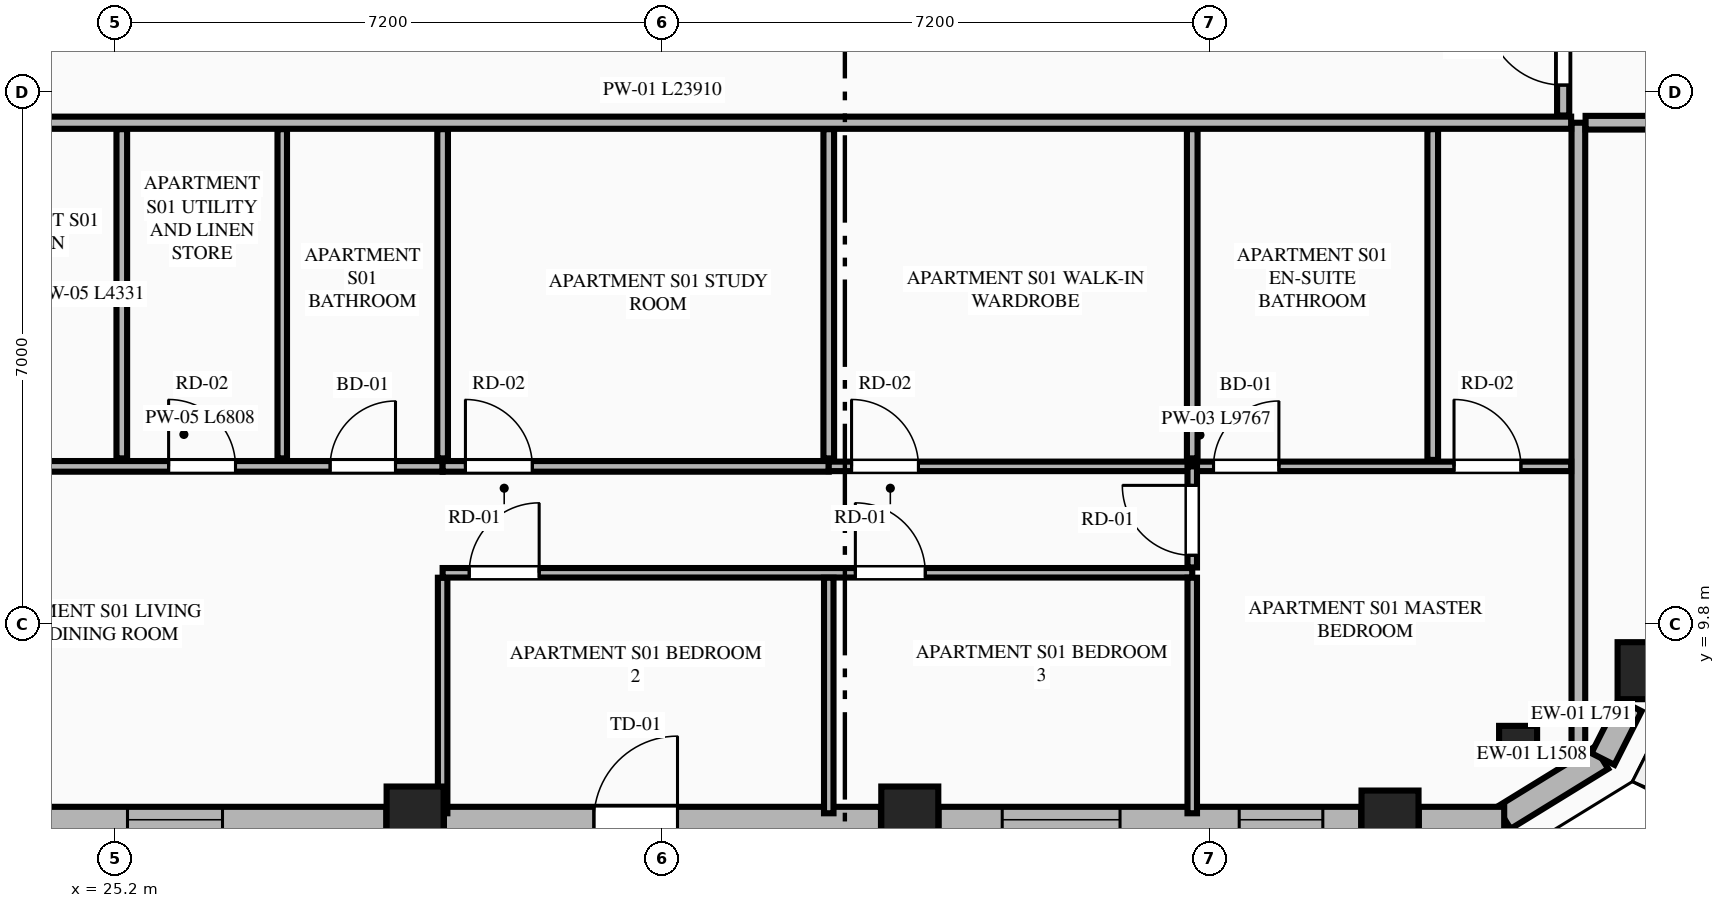
"""IFC4 building model, lengths in metres.
Left out: names, types, materials, properties, quantities, classifications, styles, units other than length and angle.
Written with IfcOpenShell. Run it as: python <this file> out.ifc"""

import sys

from ifc_helpers import new_model, si_unit, direction, frame, frame_2d, origin, origin_2d, place, context, subcontext, project, spatial, rectangle, extrude, element, fill, save


model = new_model("IFC4")
c1 = context("Model", 3, precision=1e-05, world=origin(), true_north=direction((0.0, 1.0)))
c2 = subcontext(c1, "Body", "Model", "MODEL_VIEW")
j1 = project(units=[si_unit("LENGTHUNIT", "METRE"), si_unit("PLANEANGLEUNIT", "RADIAN")], contexts=[c1])
p1 = place(None, origin())
s1 = spatial("IfcSite", under=j1, at=p1, CompositionType="ELEMENT")
p2 = place(p1, origin())
s2 = spatial("IfcBuilding", under=s1, at=p2, CompositionType="ELEMENT")
p3 = place(p2, frame((0.0, 0.0, 248.9)))
s3 = spatial("IfcBuildingStorey", under=s2, at=p3, CompositionType="ELEMENT", Elevation=248.9)
for number, where, z_axis, x_axis in (
    (1, (29.146, 7.292, 0.0), (0.0, 0.0, 1.0), (1.0, 0.0, 0.0)),
    (2, (35.654, 7.292, 0.0), (0.0, 0.0, 1.0), (1.0, 0.0, 0.0)),
    (3, (41.972, 7.239, 0.0), (0.0, 0.0, 1.0), (1.0, 0.0, 0.0)),
    (4, (45.341, 9.191, 0.0), (0.0, 0.0, 1.0), (1.0, 0.0, 0.0)),
):
    element("IfcColumn", number, at=place(p3, frame(where, z_axis=z_axis, x_axis=x_axis)), inside=s3, PredefinedType="COLUMN", context=c2, shape_type="SweptSolid", body=[
        extrude(rectangle(XDim=0.75, YDim=0.75, at=origin_2d()), origin(), (0.0, 0.0, 1.0), 3.65),
    ])
p4 = place(p3, frame((43.657, 8.215, 0.0), z_axis=(0.0, 0.0, 1.0), x_axis=(0.865256437757, 0.501329529272, 0.0)))
e5 = element("IfcColumn", 5, at=p4, inside=s3, PredefinedType="PILASTER", context=c2, shape_type="SweptSolid", body=[
    extrude(rectangle(XDim=0.5, YDim=0.35, at=origin_2d()), origin(), (0.0, 0.0, 1.0), 3.65),
])
p5 = place(p3, frame((43.469, 7.255, 0.0), z_axis=(0.0, 0.0, 1.0), x_axis=(0.851680557619, 0.52406128246, 0.0)))
e6 = element("IfcWall", 6, at=p5, inside=s3, PredefinedType="STANDARD", context=c2, shape_type="SweptSolid", body=[
    extrude(rectangle(XDim=1.508, YDim=0.34, at=frame_2d((0.754, 0.0))), origin(), (0.0, 0.0, 1.0), 3.45),
])
p6 = place(p3, frame((23.207, 7.23, 0.0), z_axis=(0.0, 0.0, 1.0), x_axis=(1.0, 0.0, 0.0)))
e7 = element("IfcWall", 7, at=p6, inside=s3, PredefinedType="STANDARD", context=c2, shape_type="SweptSolid", body=[
    extrude(rectangle(XDim=5.56, YDim=0.34, at=frame_2d((2.78, 0.0))), origin(), (0.0, 0.0, 1.0), 2.983),
])
p7 = place(p6, frame((2.155, 0.0, 0.75)))
e8 = element("IfcOpeningElement", 8, at=p7, cuts=e7, PredefinedType="OPENING", context=c2, shape_type="SweptSolid", body=[
    extrude(rectangle(XDim=1.25, YDim=1.95, at=frame_2d((0.625, 0.975))), frame((0.0, 0.18, 0.0), z_axis=(0.0, -1.0, 0.0), x_axis=(1.0, 0.0, 0.0)), (0.0, 0.0, 1.0), 0.36),
])
p8 = place(p3, frame((29.525, 7.23, 0.0), z_axis=(0.0, 0.0, 1.0), x_axis=(1.0, 0.0, 0.0)))
e9 = element("IfcWall", 9, at=p8, inside=s3, PredefinedType="STANDARD", context=c2, shape_type="SweptSolid", body=[
    extrude(rectangle(XDim=5.75, YDim=0.34, at=frame_2d((2.875, 0.0))), origin(), (0.0, 0.0, 1.0), 2.983),
])
p9 = place(p8, frame((1.973, 0.0, 0.0)))
e10 = element("IfcOpeningElement", 10, at=p9, cuts=e9, PredefinedType="OPENING", context=c2, shape_type="SweptSolid", body=[
    extrude(rectangle(XDim=1.1, YDim=2.25, at=frame_2d((0.55, 1.125))), frame((0.0, 0.18, 0.0), z_axis=(0.0, -1.0, 0.0), x_axis=(1.0, 0.0, 0.0)), (0.0, 0.0, 1.0), 0.36),
])
p10 = place(p3, frame((36.033, 7.23, 0.0), z_axis=(0.0, 0.0, 1.0), x_axis=(1.0, 0.0, 0.0)))
e11 = element("IfcWall", 11, at=p10, inside=s3, PredefinedType="STANDARD", context=c2, shape_type="SweptSolid", body=[
    extrude(rectangle(XDim=5.56, YDim=0.34, at=frame_2d((2.78, 0.0))), origin(), (0.0, 0.0, 1.0), 2.983),
])
p11 = place(p10, frame((0.837, 0.0, 0.75)))
e12 = element("IfcOpeningElement", 12, at=p11, cuts=e11, PredefinedType="OPENING", context=c2, shape_type="SweptSolid", body=[
    extrude(rectangle(XDim=1.55, YDim=2.05, at=frame_2d((0.775, 1.025))), frame((0.0, 0.18, 0.0), z_axis=(0.0, -1.0, 0.0), x_axis=(1.0, 0.0, 0.0)), (0.0, 0.0, 1.0), 0.36),
])
p12 = place(p10, frame((3.955, 0.0, 0.75)))
e13 = element("IfcOpeningElement", 13, at=p12, cuts=e11, PredefinedType="OPENING", context=c2, shape_type="SweptSolid", body=[
    extrude(rectangle(XDim=1.1, YDim=2.0, at=frame_2d((0.55, 1.0))), frame((0.0, 0.18, 0.0), z_axis=(0.0, -1.0, 0.0), x_axis=(1.0, 0.0, 0.0)), (0.0, 0.0, 1.0), 0.36),
])
p13 = place(p3, frame((42.351, 7.23, 0.0), z_axis=(0.0, 0.0, 1.0), x_axis=(1.0, 0.0, 0.0)))
e14 = element("IfcWall", 14, at=p13, inside=s3, PredefinedType="STANDARD", context=c2, shape_type="SweptSolid", body=[
    extrude(rectangle(XDim=1.123, YDim=0.34, at=frame_2d((0.562, 0.0))), origin(), (0.0, 0.0, 1.0), 3.45),
])
p14 = place(p3, frame((44.773, 8.029, 0.0), z_axis=(0.0, 0.0, 1.0), x_axis=(0.451159191899, 0.892443490404, 0.0)))
e15 = element("IfcWall", 15, at=p14, inside=s3, PredefinedType="STANDARD", context=c2, shape_type="SweptSolid", body=[
    extrude(rectangle(XDim=0.791, YDim=0.34, at=frame_2d((0.396, 0.0))), origin(), (0.0, 0.0, 1.0), 3.45),
])
p15 = place(p3, frame((44.45, 8.119, 0.0), z_axis=(0.0, 0.0, 1.0), x_axis=(0.0, 1.0, 0.0)))
e16 = element("IfcWall", 16, at=p15, inside=s3, PredefinedType="PARTITIONING", context=c2, shape_type="SweptSolid", body=[
    extrude(rectangle(XDim=8.281, YDim=0.18, at=frame_2d((4.141, 0.0))), origin(), (0.0, 0.0, 1.0), 3.45),
])
p16 = place(p3, frame((20.445, 16.4, 0.0), z_axis=(0.0, 0.0, 1.0), x_axis=(1.0, 0.0, 0.0)))
e17 = element("IfcWall", 17, at=p16, inside=s3, PredefinedType="PARTITIONING", context=c2, shape_type="SweptSolid", body=[
    extrude(rectangle(XDim=23.91, YDim=0.16, at=frame_2d((11.955, 0.0))), origin(), (0.0, 0.0, 1.0), 3.45),
])
p17 = place(p16, frame((0.705, 0.0, 0.0)))
e18 = element("IfcOpeningElement", 18, at=p17, cuts=e17, PredefinedType="OPENING", context=c2, shape_type="SweptSolid", body=[
    extrude(rectangle(XDim=1.35, YDim=2.35, at=frame_2d((0.675, 1.175))), frame((0.0, 0.09, 0.0), z_axis=(0.0, -1.0, 0.0), x_axis=(1.0, 0.0, 0.0)), (0.0, 0.0, 1.0), 0.18),
])
p18 = place(p3, frame((22.7, 11.879, 0.0), z_axis=(0.0, 0.0, 1.0), x_axis=(1.0, 0.0, 0.0)))
e19 = element("IfcWall", 19, at=p18, inside=s3, PredefinedType="PLUMBINGWALL", context=c2, shape_type="SweptSolid", body=[
    extrude(rectangle(XDim=6.808, YDim=0.14, at=frame_2d((3.404, 0.0))), origin(), (0.0, 0.0, 1.0), 3.45),
])
p19 = place(p18, frame((5.328, 0.0, 0.0)))
e20 = element("IfcOpeningElement", 20, at=p19, cuts=e19, PredefinedType="OPENING", context=c2, shape_type="SweptSolid", body=[
    extrude(rectangle(XDim=0.86, YDim=2.1, at=frame_2d((0.43, 1.05))), frame((0.0, 0.08, 0.0), z_axis=(0.0, -1.0, 0.0), x_axis=(1.0, 0.0, 0.0)), (0.0, 0.0, 1.0), 0.16),
])
p20 = place(p18, frame((0.26, 0.0, 0.0)))
e21 = element("IfcOpeningElement", 21, at=p20, cuts=e19, PredefinedType="OPENING", context=c2, shape_type="SweptSolid", body=[
    extrude(rectangle(XDim=0.88, YDim=2.15, at=frame_2d((0.44, 1.075))), frame((0.0, 0.08, 0.0), z_axis=(0.0, -1.0, 0.0), x_axis=(1.0, 0.0, 0.0)), (0.0, 0.0, 1.0), 0.16),
])
p21 = place(p18, frame((3.203, 0.0, 0.0)))
e22 = element("IfcOpeningElement", 22, at=p21, cuts=e19, PredefinedType="OPENING", context=c2, shape_type="SweptSolid", body=[
    extrude(rectangle(XDim=0.88, YDim=2.15, at=frame_2d((0.44, 1.075))), frame((0.0, 0.08, 0.0), z_axis=(0.0, -1.0, 0.0), x_axis=(1.0, 0.0, 0.0)), (0.0, 0.0, 1.0), 0.16),
])
p22 = place(p3, frame((29.508, 11.879, 0.0), z_axis=(0.0, 0.0, 1.0), x_axis=(1.0, 0.0, 0.0)))
e23 = element("IfcWall", 23, at=p22, inside=s3, PredefinedType="PLUMBINGWALL", context=c2, shape_type="SweptSolid", body=[
    extrude(rectangle(XDim=5.08, YDim=0.14, at=frame_2d((2.54, 0.0))), origin(), (0.0, 0.0, 1.0), 3.45),
])
p23 = place(p22, frame((0.3, 0.0, 0.0)))
e24 = element("IfcOpeningElement", 24, at=p23, cuts=e23, PredefinedType="OPENING", context=c2, shape_type="SweptSolid", body=[
    extrude(rectangle(XDim=0.88, YDim=2.15, at=frame_2d((0.44, 1.075))), frame((0.0, 0.08, 0.0), z_axis=(0.0, -1.0, 0.0), x_axis=(1.0, 0.0, 0.0)), (0.0, 0.0, 1.0), 0.16),
])
p24 = place(p3, frame((34.588, 11.879, 0.0), z_axis=(0.0, 0.0, 1.0), x_axis=(1.0, 0.0, 0.0)))
e25 = element("IfcWall", 25, at=p24, inside=s3, PredefinedType="PARTITIONING", context=c2, shape_type="SweptSolid", body=[
    extrude(rectangle(XDim=9.767, YDim=0.125, at=frame_2d((4.884, 0.0))), origin(), (0.0, 0.0, 1.0), 3.45),
])
p25 = place(p24, frame((5.062, 0.0, 0.0)))
e26 = element("IfcOpeningElement", 26, at=p25, cuts=e25, PredefinedType="OPENING", context=c2, shape_type="SweptSolid", body=[
    extrude(rectangle(XDim=0.86, YDim=2.1, at=frame_2d((0.43, 1.05))), frame((0.0, 0.073, 0.0), z_axis=(0.0, -1.0, 0.0), x_axis=(1.0, 0.0, 0.0)), (0.0, 0.0, 1.0), 0.145),
])
p26 = place(p24, frame((8.226, 0.0, 0.0)))
e27 = element("IfcOpeningElement", 27, at=p26, cuts=e25, PredefinedType="OPENING", context=c2, shape_type="SweptSolid", body=[
    extrude(rectangle(XDim=0.88, YDim=2.15, at=frame_2d((0.44, 1.075))), frame((0.0, 0.073, 0.0), z_axis=(0.0, -1.0, 0.0), x_axis=(1.0, 0.0, 0.0)), (0.0, 0.0, 1.0), 0.145),
])
p27 = place(p24, frame((0.3, 0.0, 0.0)))
e28 = element("IfcOpeningElement", 28, at=p27, cuts=e25, PredefinedType="OPENING", context=c2, shape_type="SweptSolid", body=[
    extrude(rectangle(XDim=0.88, YDim=2.15, at=frame_2d((0.44, 1.075))), frame((0.0, 0.073, 0.0), z_axis=(0.0, -1.0, 0.0), x_axis=(1.0, 0.0, 0.0)), (0.0, 0.0, 1.0), 0.145),
])
p28 = place(p3, frame((25.287, 11.984, 0.0), z_axis=(0.0, 0.0, 1.0), x_axis=(0.0, 1.0, 0.0)))
e29 = element("IfcWall", 29, at=p28, inside=s3, PredefinedType="PLUMBINGWALL", context=c2, shape_type="SweptSolid", body=[
    extrude(rectangle(XDim=4.331, YDim=0.14, at=frame_2d((2.166, 0.0))), origin(), (0.0, 0.0, 1.0), 3.45),
])
p29 = place(p3, frame((27.398, 11.984, 0.0), z_axis=(0.0, 0.0, 1.0), x_axis=(0.0, 1.0, 0.0)))
e30 = element("IfcWall", 30, at=p29, inside=s3, PredefinedType="PARTITIONING", context=c2, shape_type="SweptSolid", body=[
    extrude(rectangle(XDim=4.331, YDim=0.125, at=frame_2d((2.166, 0.0))), origin(), (0.0, 0.0, 1.0), 3.45),
])
p30 = place(p3, frame((29.508, 7.315, 0.0), z_axis=(0.0, 0.0, 1.0), x_axis=(0.0, 1.0, 0.0)))
e31 = element("IfcWall", 31, at=p30, inside=s3, PredefinedType="PARTITIONING", context=c2, shape_type="SweptSolid", body=[
    extrude(rectangle(XDim=3.099, YDim=0.125, at=frame_2d((1.55, 0.0))), origin(), (0.0, 0.0, 1.0), 3.45),
])
p31 = place(p3, frame((29.508, 10.479, 0.0), z_axis=(0.0, 0.0, 1.0), x_axis=(1.0, 0.0, 0.0)))
e32 = element("IfcWall", 32, at=p31, inside=s3, PredefinedType="PARTITIONING", context=c2, shape_type="SweptSolid", body=[
    extrude(rectangle(XDim=9.862, YDim=0.125, at=frame_2d((4.931, 0.0))), origin(), (0.0, 0.0, 1.0), 3.45),
])
p32 = place(p31, frame((0.35, 0.0, 0.0)))
e33 = element("IfcOpeningElement", 33, at=p32, cuts=e32, PredefinedType="OPENING", context=c2, shape_type="SweptSolid", body=[
    extrude(rectangle(XDim=0.92, YDim=2.15, at=frame_2d((0.46, 1.075))), frame((0.0, 0.073, 0.0), z_axis=(0.0, -1.0, 0.0), x_axis=(1.0, 0.0, 0.0)), (0.0, 0.0, 1.0), 0.145),
])
p33 = place(p31, frame((5.43, 0.0, 0.0)))
e34 = element("IfcOpeningElement", 34, at=p33, cuts=e32, PredefinedType="OPENING", context=c2, shape_type="SweptSolid", body=[
    extrude(rectangle(XDim=0.92, YDim=2.15, at=frame_2d((0.46, 1.075))), frame((0.0, 0.073, 0.0), z_axis=(0.0, -1.0, 0.0), x_axis=(1.0, 0.0, 0.0)), (0.0, 0.0, 1.0), 0.145),
])
p34 = place(p3, frame((39.37, 10.549, 0.0), z_axis=(0.0, 0.0, 1.0), x_axis=(0.0, 1.0, 0.0)))
e35 = element("IfcWall", 35, at=p34, inside=s3, PredefinedType="PARTITIONING", context=c2, shape_type="SweptSolid", body=[
    extrude(rectangle(XDim=1.33, YDim=0.125, at=frame_2d((0.665, 0.0))), origin(), (0.0, 0.0, 1.0), 3.45),
])
p35 = place(p34, frame((0.16, 0.0, 0.0)))
e36 = element("IfcOpeningElement", 36, at=p35, cuts=e35, PredefinedType="OPENING", context=c2, shape_type="SweptSolid", body=[
    extrude(rectangle(XDim=0.92, YDim=2.15, at=frame_2d((0.46, 1.075))), frame((0.0, 0.073, 0.0), z_axis=(0.0, -1.0, 0.0), x_axis=(1.0, 0.0, 0.0)), (0.0, 0.0, 1.0), 0.145),
])
for number, where, z_axis, x_axis in (
    (37, (29.508, 11.984, 0.0), (0.0, 0.0, 1.0), (0.0, 1.0, 0.0)),
    (38, (34.588, 11.984, 0.0), (0.0, 0.0, 1.0), (0.0, 1.0, 0.0)),
):
    element("IfcWall", number, at=place(p3, frame(where, z_axis=z_axis, x_axis=x_axis)), inside=s3, PredefinedType="PLUMBINGWALL", context=c2, shape_type="SweptSolid", body=[
        extrude(rectangle(XDim=4.331, YDim=0.14, at=frame_2d((2.166, 0.0))), origin(), (0.0, 0.0, 1.0), 3.45),
    ])
for number, where, z_axis, x_axis in (
    (39, (34.588, 7.315, 0.0), (0.0, 0.0, 1.0), (0.0, 1.0, 0.0)),
    (40, (39.37, 7.315, 0.0), (0.0, 0.0, 1.0), (0.0, 1.0, 0.0)),
):
    element("IfcWall", number, at=place(p3, frame(where, z_axis=z_axis, x_axis=x_axis)), inside=s3, PredefinedType="PARTITIONING", context=c2, shape_type="SweptSolid", body=[
        extrude(rectangle(XDim=3.099, YDim=0.125, at=frame_2d((1.55, 0.0))), origin(), (0.0, 0.0, 1.0), 3.45),
    ])
p36 = place(p3, frame((39.37, 11.984, 0.0), z_axis=(0.0, 0.0, 1.0), x_axis=(0.0, 1.0, 0.0)))
e41 = element("IfcWall", 41, at=p36, inside=s3, PredefinedType="PLUMBINGWALL", context=c2, shape_type="SweptSolid", body=[
    extrude(rectangle(XDim=4.331, YDim=0.14, at=frame_2d((2.166, 0.0))), origin(), (0.0, 0.0, 1.0), 3.45),
])
p37 = place(p3, frame((42.534, 11.964, 0.0), z_axis=(0.0, 0.0, 1.0), x_axis=(0.0, 1.0, 0.0)))
e42 = element("IfcWall", 42, at=p37, inside=s3, PredefinedType="PLUMBINGWALL", context=c2, shape_type="SweptSolid", body=[
    extrude(rectangle(XDim=4.351, YDim=0.14, at=frame_2d((2.175, 0.0))), origin(), (0.0, 0.0, 1.0), 3.45),
])
p38 = place(p3, frame((44.545, 16.4, 0.0), z_axis=(0.0, 0.0, 1.0), x_axis=(1.0, 0.0, 0.0)))
e43 = element("IfcWall", 43, at=p38, inside=s3, PredefinedType="PARTITIONING", context=c2, shape_type="SweptSolid", body=[
    extrude(rectangle(XDim=4.221, YDim=0.18, at=frame_2d((2.111, 0.0))), origin(), (0.0, 0.0, 1.0), 3.45),
])
p39 = place(p3, frame((44.25, 16.495, 0.0), z_axis=(0.0, 0.0, 1.0), x_axis=(0.0, 1.0, 0.0)))
e44 = element("IfcWall", 44, at=p39, inside=s3, PredefinedType="PARTITIONING", context=c2, shape_type="SweptSolid", body=[
    extrude(rectangle(XDim=6.134, YDim=0.16, at=frame_2d((3.067, 0.0))), origin(), (0.0, 0.0, 1.0), 3.137),
])
p40 = place(p39, frame((0.4, 0.0, 0.0)))
e45 = element("IfcOpeningElement", 45, at=p40, cuts=e44, PredefinedType="OPENING", context=c2, shape_type="SweptSolid", body=[
    extrude(rectangle(XDim=1.02, YDim=2.25, at=frame_2d((0.51, 1.125))), frame((0.0, 0.09, 0.0), z_axis=(0.0, -1.0, 0.0), x_axis=(1.0, 0.0, 0.0)), (0.0, 0.0, 1.0), 0.18),
])
p41 = place(p7, origin())
e46 = element("IfcWindow", 46, at=p41, inside=s3, PartitioningType="SINGLE_PANEL", PredefinedType="WINDOW", context=c2, shape_type="SweptSolid", body=[
    extrude(rectangle(XDim=1.25, YDim=1.95, at=frame_2d((0.625, 0.975))), frame((0.0, 0.03, 0.0), z_axis=(0.0, -1.0, 0.0), x_axis=(1.0, 0.0, 0.0)), (0.0, 0.0, 1.0), 0.06),
])
fill(e8, e46)
p42 = place(p9, origin())
e47 = element("IfcDoor", 47, at=p42, inside=s3, OperationType="SINGLE_SWING_RIGHT", PredefinedType="DOOR", context=c2, shape_type="SweptSolid", body=[
    extrude(rectangle(XDim=1.1, YDim=2.25, at=frame_2d((0.55, 1.125))), frame((0.0, 0.025, 0.0), z_axis=(0.0, -1.0, 0.0), x_axis=(1.0, 0.0, 0.0)), (0.0, 0.0, 1.0), 0.05),
])
fill(e10, e47)
p43 = place(p11, origin())
e48 = element("IfcWindow", 48, at=p43, inside=s3, PartitioningType="SINGLE_PANEL", PredefinedType="WINDOW", context=c2, shape_type="SweptSolid", body=[
    extrude(rectangle(XDim=1.55, YDim=2.05, at=frame_2d((0.775, 1.025))), frame((0.0, 0.03, 0.0), z_axis=(0.0, -1.0, 0.0), x_axis=(1.0, 0.0, 0.0)), (0.0, 0.0, 1.0), 0.06),
])
fill(e12, e48)
p44 = place(p19, origin())
e49 = element("IfcDoor", 49, at=p44, inside=s3, OperationType="SINGLE_SWING_RIGHT", PredefinedType="DOOR", context=c2, shape_type="SweptSolid", body=[
    extrude(rectangle(XDim=0.86, YDim=2.1, at=frame_2d((0.43, 1.05))), frame((0.0, 0.025, 0.0), z_axis=(0.0, -1.0, 0.0), x_axis=(1.0, 0.0, 0.0)), (0.0, 0.0, 1.0), 0.05),
])
fill(e20, e49)
p45 = place(p25, origin())
e50 = element("IfcDoor", 50, at=p45, inside=s3, OperationType="SINGLE_SWING_RIGHT", PredefinedType="DOOR", context=c2, shape_type="SweptSolid", body=[
    extrude(rectangle(XDim=0.86, YDim=2.1, at=frame_2d((0.43, 1.05))), frame((0.0, 0.025, 0.0), z_axis=(0.0, -1.0, 0.0), x_axis=(1.0, 0.0, 0.0)), (0.0, 0.0, 1.0), 0.05),
])
fill(e26, e50)
p46 = place(p26, origin())
e51 = element("IfcDoor", 51, at=p46, inside=s3, OperationType="SINGLE_SWING_LEFT", PredefinedType="DOOR", context=c2, shape_type="SweptSolid", body=[
    extrude(rectangle(XDim=0.88, YDim=2.15, at=frame_2d((0.44, 1.075))), frame((0.0, 0.025, 0.0), z_axis=(0.0, -1.0, 0.0), x_axis=(1.0, 0.0, 0.0)), (0.0, 0.0, 1.0), 0.05),
])
fill(e27, e51)
p47 = place(p21, origin())
e52 = element("IfcDoor", 52, at=p47, inside=s3, OperationType="SINGLE_SWING_LEFT", PredefinedType="DOOR", context=c2, shape_type="SweptSolid", body=[
    extrude(rectangle(XDim=0.88, YDim=2.15, at=frame_2d((0.44, 1.075))), frame((0.0, 0.025, 0.0), z_axis=(0.0, -1.0, 0.0), x_axis=(1.0, 0.0, 0.0)), (0.0, 0.0, 1.0), 0.05),
])
fill(e22, e52)
p48 = place(p23, origin())
e53 = element("IfcDoor", 53, at=p48, inside=s3, OperationType="SINGLE_SWING_LEFT", PredefinedType="DOOR", context=c2, shape_type="SweptSolid", body=[
    extrude(rectangle(XDim=0.88, YDim=2.15, at=frame_2d((0.44, 1.075))), frame((0.0, 0.025, 0.0), z_axis=(0.0, -1.0, 0.0), x_axis=(1.0, 0.0, 0.0)), (0.0, 0.0, 1.0), 0.05),
])
fill(e24, e53)
p49 = place(p32, origin())
e54 = element("IfcDoor", 54, at=p49, inside=s3, OperationType="SINGLE_SWING_RIGHT", PredefinedType="DOOR", context=c2, shape_type="SweptSolid", body=[
    extrude(rectangle(XDim=0.92, YDim=2.15, at=frame_2d((0.46, 1.075))), frame((0.0, 0.025, 0.0), z_axis=(0.0, -1.0, 0.0), x_axis=(1.0, 0.0, 0.0)), (0.0, 0.0, 1.0), 0.05),
])
fill(e33, e54)
p50 = place(p33, origin())
e55 = element("IfcDoor", 55, at=p50, inside=s3, OperationType="SINGLE_SWING_LEFT", PredefinedType="DOOR", context=c2, shape_type="SweptSolid", body=[
    extrude(rectangle(XDim=0.92, YDim=2.15, at=frame_2d((0.46, 1.075))), frame((0.0, 0.025, 0.0), z_axis=(0.0, -1.0, 0.0), x_axis=(1.0, 0.0, 0.0)), (0.0, 0.0, 1.0), 0.05),
])
fill(e34, e55)
p51 = place(p35, origin())
e56 = element("IfcDoor", 56, at=p51, inside=s3, OperationType="SINGLE_SWING_RIGHT", PredefinedType="DOOR", context=c2, shape_type="SweptSolid", body=[
    extrude(rectangle(XDim=0.92, YDim=2.15, at=frame_2d((0.46, 1.075))), frame((0.0, 0.025, 0.0), z_axis=(0.0, -1.0, 0.0), x_axis=(1.0, 0.0, 0.0)), (0.0, 0.0, 1.0), 0.05),
])
fill(e36, e56)
p52 = place(p27, origin())
e57 = element("IfcDoor", 57, at=p52, inside=s3, OperationType="SINGLE_SWING_LEFT", PredefinedType="DOOR", context=c2, shape_type="SweptSolid", body=[
    extrude(rectangle(XDim=0.88, YDim=2.15, at=frame_2d((0.44, 1.075))), frame((0.0, 0.025, 0.0), z_axis=(0.0, -1.0, 0.0), x_axis=(1.0, 0.0, 0.0)), (0.0, 0.0, 1.0), 0.05),
])
fill(e28, e57)
p53 = place(p40, origin())
e58 = element("IfcDoor", 58, at=p53, inside=s3, OperationType="SINGLE_SWING_RIGHT", PredefinedType="DOOR", context=c2, shape_type="SweptSolid", body=[
    extrude(rectangle(XDim=1.02, YDim=2.25, at=frame_2d((0.51, 1.125))), frame((0.0, 0.025, 0.0), z_axis=(0.0, -1.0, 0.0), x_axis=(1.0, 0.0, 0.0)), (0.0, 0.0, 1.0), 0.05),
])
fill(e45, e58)
p54 = place(p12, origin())
e59 = element("IfcWindow", 59, at=p54, inside=s3, PartitioningType="SINGLE_PANEL", PredefinedType="WINDOW", context=c2, shape_type="SweptSolid", body=[
    extrude(rectangle(XDim=1.1, YDim=2.0, at=frame_2d((0.55, 1.0))), frame((0.0, 0.03, 0.0), z_axis=(0.0, -1.0, 0.0), x_axis=(1.0, 0.0, 0.0)), (0.0, 0.0, 1.0), 0.06),
])
fill(e13, e59)
save(model, sys.argv[1])
